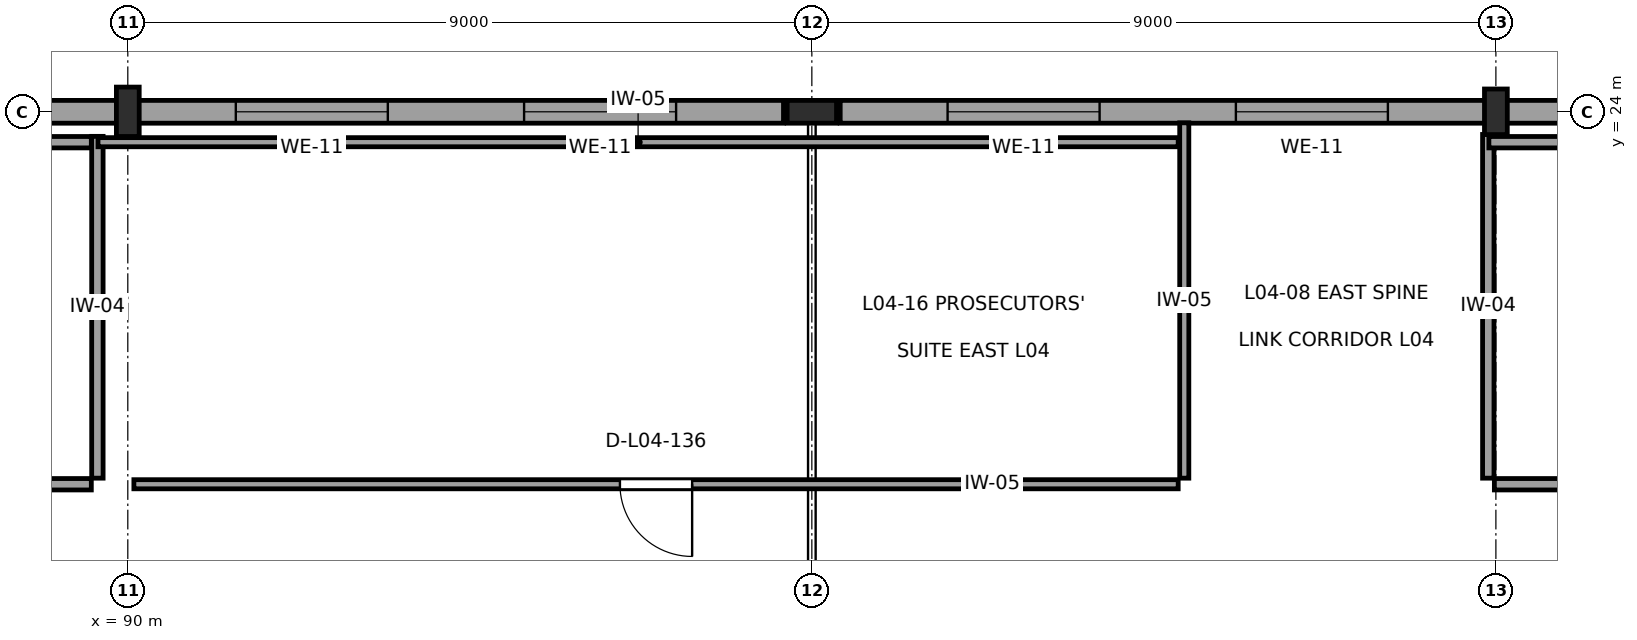
"""IFC4 building model, lengths in metres.
Left out: names, types, materials, properties, quantities, classifications, styles, units other than length and angle.
Written with IfcOpenShell. Run it as: python <this file> out.ifc"""

import sys

from ifc_helpers import new_model, si_unit, direction, frame, frame_2d, origin, origin_2d, place, context, subcontext, project, spatial, rectangle, i_section, extrude, element, fill, save


model = new_model("IFC4")
c1 = context("Model", 3, precision=1e-05, world=origin(), true_north=direction((0.0, 1.0)))
c2 = subcontext(c1, "Body", "Model", "MODEL_VIEW")
j1 = project(units=[si_unit("LENGTHUNIT", "METRE"), si_unit("PLANEANGLEUNIT", "RADIAN")], contexts=[c1])
p1 = place(None, origin())
s1 = spatial("IfcSite", under=j1, at=p1, CompositionType="ELEMENT")
p2 = place(p1, origin())
s2 = spatial("IfcBuilding", under=s1, at=p2, CompositionType="ELEMENT")
p3 = place(p2, frame((0.0, 0.0, 18.9)))
s3 = spatial("IfcBuildingStorey", under=s2, at=p3, CompositionType="ELEMENT", Elevation=18.9)
for number, where, z_axis, x_axis in (
    (1, (90.0, 24.0, 0.0), (0.0, 0.0, 1.0), (1.0, 0.0, 0.0)),
    (2, (99.0, 24.0, 0.0), (0.0, 0.0, 1.0), (0.0, 1.0, 0.0)),
):
    element("IfcColumn", number, at=place(p3, frame(where, z_axis=z_axis, x_axis=x_axis)), inside=s3, PredefinedType="COLUMN", context=c2, shape_type="SweptSolid", body=[
        extrude(i_section(OverallWidth=0.3, OverallDepth=0.65, WebThickness=0.016, FlangeThickness=0.031, at=origin_2d()), origin(), (0.0, 0.0, 1.0), 4.5),
    ])
p4 = place(p3, frame((108.0, 24.0, 0.0), z_axis=(0.0, 0.0, 1.0), x_axis=(1.0, 0.0, 0.0)))
e3 = element("IfcColumn", 3, at=p4, inside=s3, PredefinedType="COLUMN", context=c2, shape_type="SweptSolid", body=[
    extrude(i_section(OverallWidth=0.3, OverallDepth=0.6, WebThickness=0.015, FlangeThickness=0.03, at=origin_2d()), origin(), (0.0, 0.0, 1.0), 4.5),
])
p5 = place(p3, frame((98.627, 24.0, 0.0), z_axis=(0.0, 0.0, 1.0), x_axis=(-1.0, 0.0, 0.0)))
e4 = element("IfcWall", 4, at=p5, inside=s3, PredefinedType="SOLIDWALL", context=c2, shape_type="SweptSolid", body=[
    extrude(rectangle(XDim=8.619, YDim=0.3, at=frame_2d((4.31, 0.0))), origin(), (0.0, 0.0, 1.0), 3.345),
])
p6 = place(p5, frame((1.413, 0.0, 0.85)))
e5 = element("IfcOpeningElement", 5, at=p6, cuts=e4, PredefinedType="OPENING", context=c2, shape_type="SweptSolid", body=[
    extrude(rectangle(XDim=2.0, YDim=2.0, at=frame_2d((1.0, 1.0))), frame((0.0, 0.165, 0.0), z_axis=(0.0, -1.0, 0.0), x_axis=(1.0, 0.0, 0.0)), (0.0, 0.0, 1.0), 0.33),
])
p7 = place(p5, frame((5.206, 0.0, 0.85)))
e6 = element("IfcOpeningElement", 6, at=p7, cuts=e4, PredefinedType="OPENING", context=c2, shape_type="SweptSolid", body=[
    extrude(rectangle(XDim=2.0, YDim=2.0, at=frame_2d((1.0, 1.0))), frame((0.0, 0.165, 0.0), z_axis=(0.0, -1.0, 0.0), x_axis=(1.0, 0.0, 0.0)), (0.0, 0.0, 1.0), 0.33),
])
p8 = place(p3, frame((89.992, 24.0, 0.0), z_axis=(0.0, 0.0, 1.0), x_axis=(-1.0, 0.0, 0.0)))
e7 = element("IfcWall", 7, at=p8, inside=s3, PredefinedType="SOLIDWALL", context=c2, shape_type="SweptSolid", body=[
    extrude(rectangle(XDim=8.934, YDim=0.3, at=frame_2d((4.467, 0.0))), origin(), (0.0, 0.0, 1.0), 3.345),
])
p9 = place(p8, frame((1.502, 0.0, 0.85)))
e8 = element("IfcOpeningElement", 8, at=p9, cuts=e7, PredefinedType="OPENING", context=c2, shape_type="SweptSolid", body=[
    extrude(rectangle(XDim=2.0, YDim=2.0, at=frame_2d((1.0, 1.0))), frame((0.0, 0.165, 0.0), z_axis=(0.0, -1.0, 0.0), x_axis=(1.0, 0.0, 0.0)), (0.0, 0.0, 1.0), 0.33),
])
p10 = place(p8, frame((5.432, 0.0, 0.85)))
e9 = element("IfcOpeningElement", 9, at=p10, cuts=e7, PredefinedType="OPENING", context=c2, shape_type="SweptSolid", body=[
    extrude(rectangle(XDim=2.0, YDim=2.0, at=frame_2d((1.0, 1.0))), frame((0.0, 0.165, 0.0), z_axis=(0.0, -1.0, 0.0), x_axis=(1.0, 0.0, 0.0)), (0.0, 0.0, 1.0), 0.33),
])
p11 = place(p3, frame((116.992, 24.0, 0.0), z_axis=(0.0, 0.0, 1.0), x_axis=(-1.0, 0.0, 0.0)))
e10 = element("IfcWall", 10, at=p11, inside=s3, PredefinedType="SOLIDWALL", context=c2, shape_type="SweptSolid", body=[
    extrude(rectangle(XDim=8.984, YDim=0.3, at=frame_2d((4.492, 0.0))), origin(), (0.0, 0.0, 1.0), 3.247),
])
p12 = place(p11, frame((1.516, 0.0, 0.85)))
e11 = element("IfcOpeningElement", 11, at=p12, cuts=e10, PredefinedType="OPENING", context=c2, shape_type="SweptSolid", body=[
    extrude(rectangle(XDim=2.0, YDim=2.0, at=frame_2d((1.0, 1.0))), frame((0.0, 0.165, 0.0), z_axis=(0.0, -1.0, 0.0), x_axis=(1.0, 0.0, 0.0)), (0.0, 0.0, 1.0), 0.33),
])
p13 = place(p11, frame((5.468, 0.0, 0.85)))
e12 = element("IfcOpeningElement", 12, at=p13, cuts=e10, PredefinedType="OPENING", context=c2, shape_type="SweptSolid", body=[
    extrude(rectangle(XDim=2.0, YDim=2.0, at=frame_2d((1.0, 1.0))), frame((0.0, 0.165, 0.0), z_axis=(0.0, -1.0, 0.0), x_axis=(1.0, 0.0, 0.0)), (0.0, 0.0, 1.0), 0.33),
])
p14 = place(p3, frame((107.992, 24.0, 0.0), z_axis=(0.0, 0.0, 1.0), x_axis=(-1.0, 0.0, 0.0)))
e13 = element("IfcWall", 13, at=p14, inside=s3, PredefinedType="SOLIDWALL", context=c2, shape_type="SweptSolid", body=[
    extrude(rectangle(XDim=8.619, YDim=0.3, at=frame_2d((4.31, 0.0))), origin(), (0.0, 0.0, 1.0), 3.345),
])
p15 = place(p14, frame((1.413, 0.0, 0.85)))
e14 = element("IfcOpeningElement", 14, at=p15, cuts=e13, PredefinedType="OPENING", context=c2, shape_type="SweptSolid", body=[
    extrude(rectangle(XDim=2.0, YDim=2.0, at=frame_2d((1.0, 1.0))), frame((0.0, 0.165, 0.0), z_axis=(0.0, -1.0, 0.0), x_axis=(1.0, 0.0, 0.0)), (0.0, 0.0, 1.0), 0.33),
])
p16 = place(p14, frame((5.206, 0.0, 0.85)))
e15 = element("IfcOpeningElement", 15, at=p16, cuts=e13, PredefinedType="OPENING", context=c2, shape_type="SweptSolid", body=[
    extrude(rectangle(XDim=2.0, YDim=2.0, at=frame_2d((1.0, 1.0))), frame((0.0, 0.165, 0.0), z_axis=(0.0, -1.0, 0.0), x_axis=(1.0, 0.0, 0.0)), (0.0, 0.0, 1.0), 0.33),
])
p17 = place(p3, frame((89.52, 19.1, 0.0), z_axis=(0.0, 0.0, 1.0), x_axis=(-1.0, 0.0, 0.0)))
e16 = element("IfcWall", 16, at=p17, inside=s3, PredefinedType="PARTITIONING", context=c2, shape_type="SweptSolid", body=[
    extrude(rectangle(XDim=44.375, YDim=0.15, at=frame_2d((22.188, 0.0))), origin(), (0.0, 0.0, 1.0), 4.14),
])
p18 = place(p17, frame((21.663, 0.0, 0.0)))
e17 = element("IfcOpeningElement", 17, at=p18, cuts=e16, PredefinedType="OPENING", context=c2, shape_type="SweptSolid", body=[
    extrude(rectangle(XDim=1.05, YDim=2.25, at=frame_2d((0.525, 1.125))), frame((0.0, 0.09, 0.0), z_axis=(0.0, -1.0, 0.0), x_axis=(1.0, 0.0, 0.0)), (0.0, 0.0, 1.0), 0.18),
])
p19 = place(p3, frame((45.008, 23.6, 0.0), z_axis=(0.0, 0.0, 1.0), x_axis=(1.0, 0.0, 0.0)))
e18 = element("IfcWall", 18, at=p19, inside=s3, PredefinedType="PARTITIONING", context=c2, shape_type="SweptSolid", body=[
    extrude(rectangle(XDim=44.512, YDim=0.15, at=frame_2d((22.256, 0.0))), origin(), (0.0, 0.0, 1.0), 4.14),
])
p20 = place(p3, frame((89.6, 23.677, 0.0), z_axis=(0.0, 0.0, 1.0), x_axis=(0.0, -1.0, 0.0)))
e19 = element("IfcWall", 19, at=p20, inside=s3, PredefinedType="PARTITIONING", context=c2, shape_type="SweptSolid", body=[
    extrude(rectangle(XDim=4.497, YDim=0.15, at=frame_2d((2.249, 0.0))), origin(), (0.0, 0.0, 1.0), 4.14),
])
p21 = place(p3, frame((89.608, 23.6, 0.0), z_axis=(0.0, 0.0, 1.0), x_axis=(1.0, 0.0, 0.0)))
e20 = element("IfcWall", 20, at=p21, inside=s3, PredefinedType="PARTITIONING", context=c2, shape_type="SweptSolid", body=[
    extrude(rectangle(XDim=14.212, YDim=0.12, at=frame_2d((7.106, 0.0))), origin(), (0.0, 0.0, 1.0), 4.14),
])
p22 = place(p3, frame((103.9, 23.855, 0.0), z_axis=(0.0, 0.0, 1.0), x_axis=(0.0, -1.0, 0.0)))
e21 = element("IfcWall", 21, at=p22, inside=s3, PredefinedType="PARTITIONING", context=c2, shape_type="SweptSolid", body=[
    extrude(rectangle(XDim=4.675, YDim=0.12, at=frame_2d((2.337, 0.0))), origin(), (0.0, 0.0, 1.0), 4.14),
])
p23 = place(p3, frame((103.82, 19.1, 0.0), z_axis=(0.0, 0.0, 1.0), x_axis=(-1.0, 0.0, 0.0)))
e22 = element("IfcWall", 22, at=p23, inside=s3, PredefinedType="PARTITIONING", context=c2, shape_type="SweptSolid", body=[
    extrude(rectangle(XDim=13.74, YDim=0.12, at=frame_2d((6.87, 0.0))), origin(), (0.0, 0.0, 1.0), 4.14),
])
p24 = place(p23, frame((6.395, 0.0, 0.0)))
e23 = element("IfcOpeningElement", 23, at=p24, cuts=e22, PredefinedType="OPENING", context=c2, shape_type="SweptSolid", body=[
    extrude(rectangle(XDim=0.95, YDim=2.15, at=frame_2d((0.475, 1.075))), frame((0.0, 0.075, 0.0), z_axis=(0.0, -1.0, 0.0), x_axis=(1.0, 0.0, 0.0)), (0.0, 0.0, 1.0), 0.15),
])
p25 = place(p3, frame((147.455, 19.1, 0.0), z_axis=(0.0, 0.0, 1.0), x_axis=(-1.0, 0.0, 0.0)))
e24 = element("IfcWall", 24, at=p25, inside=s3, PredefinedType="PARTITIONING", context=c2, shape_type="SweptSolid", body=[
    extrude(rectangle(XDim=39.475, YDim=0.15, at=frame_2d((19.738, 0.0))), origin(), (0.0, 0.0, 1.0), 4.14),
])
p26 = place(p25, frame((19.213, 0.0, 0.0)))
e25 = element("IfcOpeningElement", 25, at=p26, cuts=e24, PredefinedType="OPENING", context=c2, shape_type="SweptSolid", body=[
    extrude(rectangle(XDim=1.05, YDim=2.25, at=frame_2d((0.525, 1.125))), frame((0.0, 0.09, 0.0), z_axis=(0.0, -1.0, 0.0), x_axis=(1.0, 0.0, 0.0)), (0.0, 0.0, 1.0), 0.18),
])
p27 = place(p3, frame((107.9, 19.18, 0.0), z_axis=(0.0, 0.0, 1.0), x_axis=(0.0, 1.0, 0.0)))
e26 = element("IfcWall", 26, at=p27, inside=s3, PredefinedType="PARTITIONING", context=c2, shape_type="SweptSolid", body=[
    extrude(rectangle(XDim=4.522, YDim=0.15, at=frame_2d((2.261, 0.0))), origin(), (0.0, 0.0, 1.0), 3.655),
])
p28 = place(p3, frame((107.908, 23.6, 0.0), z_axis=(0.0, 0.0, 1.0), x_axis=(1.0, 0.0, 0.0)))
e27 = element("IfcWall", 27, at=p28, inside=s3, PredefinedType="PARTITIONING", context=c2, shape_type="SweptSolid", body=[
    extrude(rectangle(XDim=39.122, YDim=0.15, at=frame_2d((19.561, 0.0))), origin(), (0.0, 0.0, 1.0), 4.14),
])
p29 = place(p6, origin())
e28 = element("IfcWindow", 28, at=p29, inside=s3, PartitioningType="SINGLE_PANEL", PredefinedType="WINDOW", context=c2, shape_type="SweptSolid", body=[
    extrude(rectangle(XDim=2.0, YDim=2.0, at=frame_2d((1.0, 1.0))), frame((0.0, 0.03, 0.0), z_axis=(0.0, -1.0, 0.0), x_axis=(1.0, 0.0, 0.0)), (0.0, 0.0, 1.0), 0.06),
])
fill(e5, e28)
p30 = place(p7, origin())
e29 = element("IfcWindow", 29, at=p30, inside=s3, PartitioningType="SINGLE_PANEL", PredefinedType="WINDOW", context=c2, shape_type="SweptSolid", body=[
    extrude(rectangle(XDim=2.0, YDim=2.0, at=frame_2d((1.0, 1.0))), frame((0.0, 0.03, 0.0), z_axis=(0.0, -1.0, 0.0), x_axis=(1.0, 0.0, 0.0)), (0.0, 0.0, 1.0), 0.06),
])
fill(e6, e29)
p31 = place(p15, origin())
e30 = element("IfcWindow", 30, at=p31, inside=s3, PartitioningType="SINGLE_PANEL", PredefinedType="WINDOW", context=c2, shape_type="SweptSolid", body=[
    extrude(rectangle(XDim=2.0, YDim=2.0, at=frame_2d((1.0, 1.0))), frame((0.0, 0.03, 0.0), z_axis=(0.0, -1.0, 0.0), x_axis=(1.0, 0.0, 0.0)), (0.0, 0.0, 1.0), 0.06),
])
fill(e14, e30)
p32 = place(p16, origin())
e31 = element("IfcWindow", 31, at=p32, inside=s3, PartitioningType="SINGLE_PANEL", PredefinedType="WINDOW", context=c2, shape_type="SweptSolid", body=[
    extrude(rectangle(XDim=2.0, YDim=2.0, at=frame_2d((1.0, 1.0))), frame((0.0, 0.03, 0.0), z_axis=(0.0, -1.0, 0.0), x_axis=(1.0, 0.0, 0.0)), (0.0, 0.0, 1.0), 0.06),
])
fill(e15, e31)
p33 = place(p24, origin())
e32 = element("IfcDoor", 32, at=p33, inside=s3, OperationType="SINGLE_SWING_LEFT", PredefinedType="DOOR", context=c2, shape_type="SweptSolid", body=[
    extrude(rectangle(XDim=0.95, YDim=2.15, at=frame_2d((0.475, 1.075))), frame((0.0, 0.025, 0.0), z_axis=(0.0, -1.0, 0.0), x_axis=(1.0, 0.0, 0.0)), (0.0, 0.0, 1.0), 0.05),
])
fill(e23, e32)
save(model, sys.argv[1])
